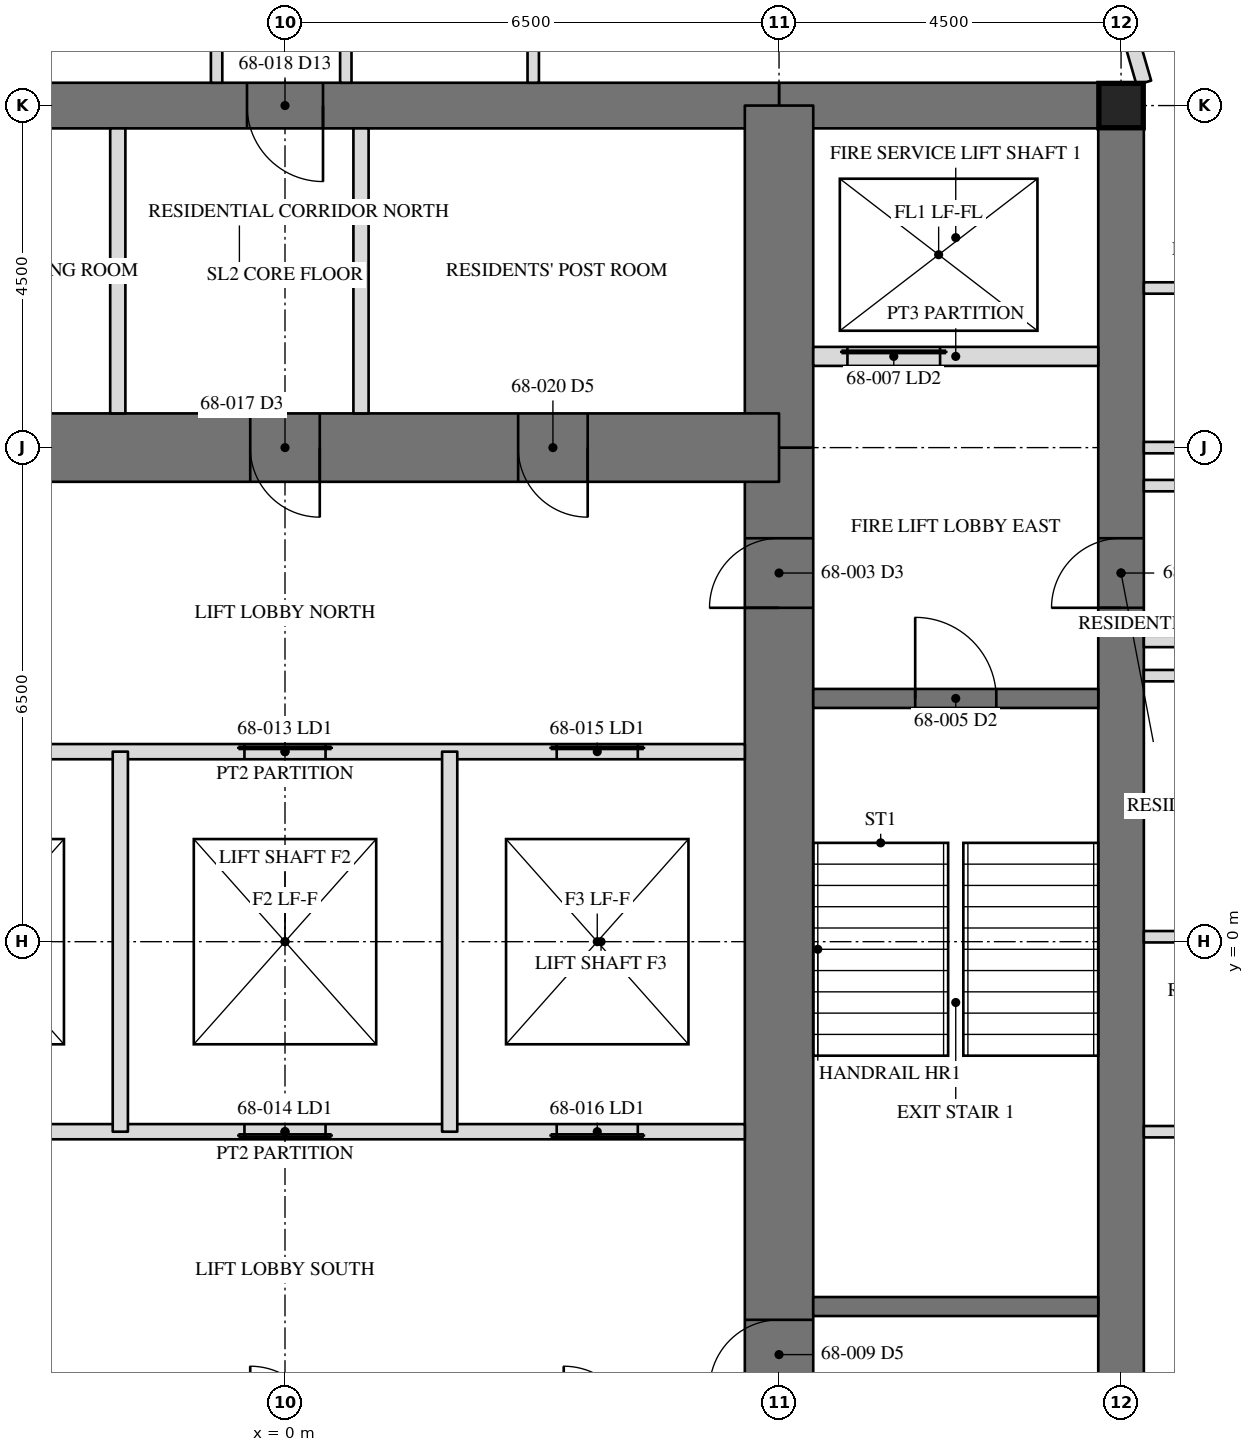
"""IFC4 building model, lengths in metres.
Left out: names, types, materials, properties, quantities, classifications, styles, units other than length and angle.
Written with IfcOpenShell. Run it as: python <this file> out.ifc"""

import sys

from ifc_helpers import new_model, si_unit, direction, frame, frame_2d, origin, origin_2d, place, context, subcontext, project, spatial, rectangle, hollow_rectangle, extrude, element, fill, save


model = new_model("IFC4")
c1 = context("Model", 3, precision=1e-05, world=origin(), true_north=direction((0.0, 1.0)))
c2 = subcontext(c1, "Body", "Model", "MODEL_VIEW")
j1 = project(units=[si_unit("LENGTHUNIT", "METRE"), si_unit("PLANEANGLEUNIT", "RADIAN")], contexts=[c1])
p1 = place(None, origin())
s1 = spatial("IfcSite", under=j1, at=p1, CompositionType="ELEMENT")
p2 = place(p1, origin())
s2 = spatial("IfcBuilding", under=s1, at=p2, CompositionType="ELEMENT")
p3 = place(p2, frame((0.0, 0.0, 277.6)))
s3 = spatial("IfcBuildingStorey", under=s2, at=p3, CompositionType="ELEMENT", Elevation=277.6)
p4 = place(p3, frame((11.0, -11.0, 0.0), z_axis=(0.0, 0.0, 1.0), x_axis=(0.0, 1.0, 0.0)))
e1 = element("IfcWall", 1, at=p4, inside=s3, PredefinedType="SHEAR", context=c2, shape_type="SweptSolid", body=[
    extrude(rectangle(XDim=22.0, YDim=0.6, at=frame_2d((11.0, 0.0))), origin(), (0.0, 0.0, 1.0), 3.6),
])
p5 = place(p4, frame((15.393, 0.0, 0.0)))
e2 = element("IfcOpeningElement", 2, at=p5, cuts=e1, PredefinedType="OPENING", context=c2, shape_type="SweptSolid", body=[
    extrude(rectangle(XDim=0.915, YDim=2.134, at=frame_2d((0.458, 1.067))), frame((0.0, 0.31, 0.0), z_axis=(0.0, -1.0, 0.0), x_axis=(1.0, 0.0, 0.0)), (0.0, 0.0, 1.0), 0.62),
])
p6 = place(p3, frame((11.0, 11.0, 0.0), z_axis=(0.0, 0.0, 1.0), x_axis=(-1.0, 0.0, 0.0)))
e3 = element("IfcWall", 3, at=p6, inside=s3, PredefinedType="SHEAR", context=c2, shape_type="SweptSolid", body=[
    extrude(rectangle(XDim=4.5, YDim=0.6, at=frame_2d((2.25, 0.0))), origin(), (0.0, 0.0, 1.0), 3.6),
])
p7 = place(p3, frame((6.5, 11.0, 0.0), z_axis=(0.0, 0.0, 1.0), x_axis=(-1.0, 0.0, 0.0)))
e4 = element("IfcWall", 4, at=p7, inside=s3, PredefinedType="SHEAR", context=c2, shape_type="SweptSolid", body=[
    extrude(rectangle(XDim=13.0, YDim=0.6, at=frame_2d((6.5, 0.0))), origin(), (0.0, 0.0, 1.0), 3.6),
])
p8 = place(p7, frame((6.0, 0.0, 0.0)))
e5 = element("IfcOpeningElement", 5, at=p8, cuts=e4, PredefinedType="OPENING", context=c2, shape_type="SweptSolid", body=[
    extrude(rectangle(XDim=1.0, YDim=2.134, at=frame_2d((0.5, 1.067))), frame((0.0, 0.31, 0.0), z_axis=(0.0, -1.0, 0.0), x_axis=(1.0, 0.0, 0.0)), (0.0, 0.0, 1.0), 0.62),
])
p9 = place(p3, frame((6.5, -6.5, 0.0), z_axis=(0.0, 0.0, 1.0), x_axis=(0.0, 1.0, 0.0)))
e6 = element("IfcWall", 6, at=p9, inside=s3, PredefinedType="SHEAR", context=c2, shape_type="SweptSolid", body=[
    extrude(rectangle(XDim=13.0, YDim=0.9, at=frame_2d((6.5, 0.0))), origin(), (0.0, 0.0, 1.0), 3.6),
])
p10 = place(p9, frame((10.893, 0.0, 0.0)))
e7 = element("IfcOpeningElement", 7, at=p10, cuts=e6, PredefinedType="OPENING", context=c2, shape_type="SweptSolid", body=[
    extrude(rectangle(XDim=0.915, YDim=2.134, at=frame_2d((0.458, 1.067))), frame((0.0, 0.46, 0.0), z_axis=(0.0, -1.0, 0.0), x_axis=(1.0, 0.0, 0.0)), (0.0, 0.0, 1.0), 0.92),
])
p11 = place(p9, frame((0.61, 0.0, 0.0)))
e8 = element("IfcOpeningElement", 8, at=p11, cuts=e6, PredefinedType="OPENING", context=c2, shape_type="SweptSolid", body=[
    extrude(rectangle(XDim=0.915, YDim=2.134, at=frame_2d((0.458, 1.067))), frame((0.0, 0.46, 0.0), z_axis=(0.0, -1.0, 0.0), x_axis=(1.0, 0.0, 0.0)), (0.0, 0.0, 1.0), 0.92),
])
p12 = place(p3, frame((6.5, 6.5, 0.0), z_axis=(0.0, 0.0, 1.0), x_axis=(0.0, 1.0, 0.0)))
e9 = element("IfcWall", 9, at=p12, inside=s3, PredefinedType="SHEAR", context=c2, shape_type="SweptSolid", body=[
    extrude(rectangle(XDim=4.5, YDim=0.9, at=frame_2d((2.25, 0.0))), origin(), (0.0, 0.0, 1.0), 3.6),
])
p13 = place(p3, frame((6.5, 6.5, 0.0), z_axis=(0.0, 0.0, 1.0), x_axis=(-1.0, 0.0, 0.0)))
e10 = element("IfcWall", 10, at=p13, inside=s3, PredefinedType="SHEAR", context=c2, shape_type="SweptSolid", body=[
    extrude(rectangle(XDim=13.0, YDim=0.9, at=frame_2d((6.5, 0.0))), origin(), (0.0, 0.0, 1.0), 3.6),
])
p14 = place(p13, frame((6.042, 0.0, 0.0)))
e11 = element("IfcOpeningElement", 11, at=p14, cuts=e10, PredefinedType="OPENING", context=c2, shape_type="SweptSolid", body=[
    extrude(rectangle(XDim=0.915, YDim=2.134, at=frame_2d((0.458, 1.067))), frame((0.0, 0.46, 0.0), z_axis=(0.0, -1.0, 0.0), x_axis=(1.0, 0.0, 0.0)), (0.0, 0.0, 1.0), 0.92),
])
p15 = place(p13, frame((10.066, 0.0, 0.0)))
e12 = element("IfcOpeningElement", 12, at=p15, cuts=e10, PredefinedType="OPENING", context=c2, shape_type="SweptSolid", body=[
    extrude(rectangle(XDim=1.118, YDim=2.134, at=frame_2d((0.559, 1.067))), frame((0.0, 0.46, 0.0), z_axis=(0.0, -1.0, 0.0), x_axis=(1.0, 0.0, 0.0)), (0.0, 0.0, 1.0), 0.92),
])
p16 = place(p13, frame((2.518, 0.0, 0.0)))
e13 = element("IfcOpeningElement", 13, at=p16, cuts=e10, PredefinedType="OPENING", context=c2, shape_type="SweptSolid", body=[
    extrude(rectangle(XDim=0.915, YDim=2.134, at=frame_2d((0.458, 1.067))), frame((0.0, 0.46, 0.0), z_axis=(0.0, -1.0, 0.0), x_axis=(1.0, 0.0, 0.0)), (0.0, 0.0, 1.0), 0.92),
])
p17 = place(p3, frame((11.0, 11.0, 0.0), z_axis=(0.0, 0.0, 1.0), x_axis=(1.0, 0.0, 0.0)))
e14 = element("IfcColumn", 14, at=p17, inside=s3, PredefinedType="COLUMN", context=c2, shape_type="SweptSolid", body=[
    extrude(hollow_rectangle(XDim=0.584, YDim=0.584, WallThickness=0.051, at=origin_2d()), origin(), (0.0, 0.0, 1.0), 3.6),
])
p18 = place(p3, frame((6.95, -4.8, 0.0), z_axis=(0.0, 0.0, 1.0), x_axis=(1.0, 0.0, 0.0)))
e15 = element("IfcWall", 15, at=p18, inside=s3, PredefinedType="SOLIDWALL", context=c2, shape_type="SweptSolid", body=[
    extrude(rectangle(XDim=3.75, YDim=0.25, at=frame_2d((1.875, 0.0))), origin(), (0.0, 0.0, 1.0), 3.41),
])
p19 = place(p3, frame((6.95, 3.2, 0.0), z_axis=(0.0, 0.0, 1.0), x_axis=(1.0, 0.0, 0.0)))
e16 = element("IfcWall", 16, at=p19, inside=s3, PredefinedType="SOLIDWALL", context=c2, shape_type="SweptSolid", body=[
    extrude(rectangle(XDim=3.75, YDim=0.25, at=frame_2d((1.875, 0.0))), origin(), (0.0, 0.0, 1.0), 3.41),
])
p20 = place(p19, frame((1.342, 0.0, 0.0)))
e17 = element("IfcOpeningElement", 17, at=p20, cuts=e16, PredefinedType="OPENING", context=c2, shape_type="SweptSolid", body=[
    extrude(rectangle(XDim=1.067, YDim=2.134, at=frame_2d((0.533, 1.067))), frame((0.0, 0.135, 0.0), z_axis=(0.0, -1.0, 0.0), x_axis=(1.0, 0.0, 0.0)), (0.0, 0.0, 1.0), 0.27),
])
p21 = place(p3, frame((6.95, 7.7, 0.0), z_axis=(0.0, 0.0, 1.0), x_axis=(1.0, 0.0, 0.0)))
e18 = element("IfcWall", 18, at=p21, inside=s3, PredefinedType="PARTITIONING", context=c2, shape_type="SweptSolid", body=[
    extrude(rectangle(XDim=3.75, YDim=0.25, at=frame_2d((1.875, 0.0))), origin(), (0.0, 0.0, 1.0), 3.41),
])
p22 = place(p21, frame((0.45, 0.0, 0.0)))
e19 = element("IfcOpeningElement", 19, at=p22, cuts=e18, PredefinedType="OPENING", context=c2, shape_type="SweptSolid", body=[
    extrude(rectangle(XDim=1.219, YDim=2.134, at=frame_2d((0.609, 1.067))), frame((0.0, 0.135, 0.0), z_axis=(0.0, -1.0, 0.0), x_axis=(1.0, 0.0, 0.0)), (0.0, 0.0, 1.0), 0.27),
])
p23 = place(p3, frame((-6.05, 2.5, 0.0), z_axis=(0.0, 0.0, 1.0), x_axis=(1.0, 0.0, 0.0)))
e20 = element("IfcWall", 20, at=p23, inside=s3, PredefinedType="PARTITIONING", context=c2, shape_type="SweptSolid", body=[
    extrude(rectangle(XDim=12.1, YDim=0.2, at=frame_2d((6.05, 0.0))), origin(), (0.0, 0.0, 1.0), 3.41),
])
p24 = place(p23, frame((1.408, 0.0, 0.0)))
e21 = element("IfcOpeningElement", 21, at=p24, cuts=e20, PredefinedType="OPENING", context=c2, shape_type="SweptSolid", body=[
    extrude(rectangle(XDim=1.067, YDim=2.134, at=frame_2d((0.533, 1.067))), frame((0.0, 0.11, 0.0), z_axis=(0.0, -1.0, 0.0), x_axis=(1.0, 0.0, 0.0)), (0.0, 0.0, 1.0), 0.22),
])
p25 = place(p23, frame((5.517, 0.0, 0.0)))
e22 = element("IfcOpeningElement", 22, at=p25, cuts=e20, PredefinedType="OPENING", context=c2, shape_type="SweptSolid", body=[
    extrude(rectangle(XDim=1.067, YDim=2.134, at=frame_2d((0.533, 1.067))), frame((0.0, 0.11, 0.0), z_axis=(0.0, -1.0, 0.0), x_axis=(1.0, 0.0, 0.0)), (0.0, 0.0, 1.0), 0.22),
])
p26 = place(p23, frame((9.625, 0.0, 0.0)))
e23 = element("IfcOpeningElement", 23, at=p26, cuts=e20, PredefinedType="OPENING", context=c2, shape_type="SweptSolid", body=[
    extrude(rectangle(XDim=1.067, YDim=2.134, at=frame_2d((0.533, 1.067))), frame((0.0, 0.11, 0.0), z_axis=(0.0, -1.0, 0.0), x_axis=(1.0, 0.0, 0.0)), (0.0, 0.0, 1.0), 0.22),
])
p27 = place(p3, frame((6.05, -2.5, 0.0), z_axis=(0.0, 0.0, 1.0), x_axis=(-1.0, 0.0, 0.0)))
e24 = element("IfcWall", 24, at=p27, inside=s3, PredefinedType="PARTITIONING", context=c2, shape_type="SweptSolid", body=[
    extrude(rectangle(XDim=12.1, YDim=0.2, at=frame_2d((6.05, 0.0))), origin(), (0.0, 0.0, 1.0), 3.41),
])
p28 = place(p27, frame((9.625, 0.0, 0.0)))
e25 = element("IfcOpeningElement", 25, at=p28, cuts=e24, PredefinedType="OPENING", context=c2, shape_type="SweptSolid", body=[
    extrude(rectangle(XDim=1.067, YDim=2.134, at=frame_2d((0.533, 1.067))), frame((0.0, 0.11, 0.0), z_axis=(0.0, -1.0, 0.0), x_axis=(1.0, 0.0, 0.0)), (0.0, 0.0, 1.0), 0.22),
])
p29 = place(p27, frame((5.517, 0.0, 0.0)))
e26 = element("IfcOpeningElement", 26, at=p29, cuts=e24, PredefinedType="OPENING", context=c2, shape_type="SweptSolid", body=[
    extrude(rectangle(XDim=1.067, YDim=2.134, at=frame_2d((0.533, 1.067))), frame((0.0, 0.11, 0.0), z_axis=(0.0, -1.0, 0.0), x_axis=(1.0, 0.0, 0.0)), (0.0, 0.0, 1.0), 0.22),
])
p30 = place(p27, frame((1.408, 0.0, 0.0)))
e27 = element("IfcOpeningElement", 27, at=p30, cuts=e24, PredefinedType="OPENING", context=c2, shape_type="SweptSolid", body=[
    extrude(rectangle(XDim=1.067, YDim=2.134, at=frame_2d((0.533, 1.067))), frame((0.0, 0.11, 0.0), z_axis=(0.0, -1.0, 0.0), x_axis=(1.0, 0.0, 0.0)), (0.0, 0.0, 1.0), 0.22),
])
for number, where, z_axis, x_axis in (
    (28, (-2.167, -2.5, 0.0), (0.0, 0.0, 1.0), (0.0, 1.0, 0.0)),
    (29, (2.167, -2.5, 0.0), (0.0, 0.0, 1.0), (0.0, 1.0, 0.0)),
):
    element("IfcWall", number, at=place(p3, frame(where, z_axis=z_axis, x_axis=x_axis)), inside=s3, PredefinedType="PARTITIONING", context=c2, shape_type="SweptSolid", body=[
        extrude(rectangle(XDim=5.0, YDim=0.2, at=frame_2d((2.5, 0.0))), origin(), (0.0, 0.0, 1.0), 3.41),
    ])
for number, where, z_axis, x_axis in (
    (30, (-2.2, 6.95, 0.0), (0.0, 0.0, 1.0), (0.0, 1.0, 0.0)),
    (31, (1.0, 6.95, 0.0), (0.0, 0.0, 1.0), (0.0, 1.0, 0.0)),
):
    element("IfcWall", number, at=place(p3, frame(where, z_axis=z_axis, x_axis=x_axis)), inside=s3, PredefinedType="PARTITIONING", context=c2, shape_type="SweptSolid", body=[
        extrude(rectangle(XDim=3.75, YDim=0.2, at=frame_2d((1.875, 0.0))), origin(), (0.0, 0.0, 1.0), 3.41),
    ])
p31 = place(p3, frame((11.3, 11.3, 0.0), z_axis=(0.0, 0.0, 1.0), x_axis=(-0.278099250491, 0.960552344683, 0.0)))
e32 = element("IfcWall", 32, at=p31, inside=s3, PredefinedType="PARTITIONING", context=c2, shape_type="SweptSolid", body=[
    extrude(rectangle(XDim=1.584, YDim=0.2, at=frame_2d((0.792, 0.0))), origin(), (0.0, 0.0, 1.0), 3.41),
])
p32 = place(p3, frame((11.3, 0.065, 0.0), z_axis=(0.0, 0.0, 1.0), x_axis=(1.0, 0.0, 0.0)))
e33 = element("IfcWall", 33, at=p32, inside=s3, PredefinedType="PARTITIONING", context=c2, shape_type="SweptSolid", body=[
    extrude(rectangle(XDim=5.615, YDim=0.15, at=frame_2d((2.808, 0.0))), origin(), (0.0, 0.0, 1.0), 2.709),
])
p33 = place(p32, frame((3.042, 0.0, 0.0)))
e34 = element("IfcOpeningElement", 34, at=p33, cuts=e33, PredefinedType="OPENING", context=c2, shape_type="SweptSolid", body=[
    extrude(rectangle(XDim=0.915, YDim=2.134, at=frame_2d((0.458, 1.067))), frame((0.0, 0.085, 0.0), z_axis=(0.0, -1.0, 0.0), x_axis=(1.0, 0.0, 0.0)), (0.0, 0.0, 1.0), 0.17),
])
p34 = place(p32, frame((4.058, 0.0, 0.0)))
e35 = element("IfcOpeningElement", 35, at=p34, cuts=e33, PredefinedType="OPENING", context=c2, shape_type="SweptSolid", body=[
    extrude(rectangle(XDim=0.915, YDim=2.134, at=frame_2d((0.458, 1.067))), frame((0.0, 0.085, 0.0), z_axis=(0.0, -1.0, 0.0), x_axis=(1.0, 0.0, 0.0)), (0.0, 0.0, 1.0), 0.17),
])
p35 = place(p3, frame((11.3, 6.5, 0.0), z_axis=(0.0, 0.0, 1.0), x_axis=(1.0, 0.0, 0.0)))
e36 = element("IfcWall", 36, at=p35, inside=s3, PredefinedType="PARTITIONING", context=c2, shape_type="SweptSolid", body=[
    extrude(rectangle(XDim=5.615, YDim=0.15, at=frame_2d((2.808, 0.0))), origin(), (0.0, 0.0, 1.0), 2.966),
])
p36 = place(p35, frame((2.742, 0.0, 0.0)))
e37 = element("IfcOpeningElement", 37, at=p36, cuts=e36, PredefinedType="OPENING", context=c2, shape_type="SweptSolid", body=[
    extrude(rectangle(XDim=0.915, YDim=2.134, at=frame_2d((0.458, 1.067))), frame((0.0, 0.085, 0.0), z_axis=(0.0, -1.0, 0.0), x_axis=(1.0, 0.0, 0.0)), (0.0, 0.0, 1.0), 0.17),
])
for number, where, z_axis, x_axis in (
    (38, (11.3, 3.95, 0.0), (0.0, 0.0, 1.0), (1.0, 0.0, 0.0)),
    (39, (11.3, 6.0, 0.0), (0.0, 0.0, 1.0), (1.0, 0.0, 0.0)),
):
    element("IfcWall", number, at=place(p3, frame(where, z_axis=z_axis, x_axis=x_axis)), inside=s3, PredefinedType="PARTITIONING", context=c2, shape_type="SweptSolid", body=[
        extrude(rectangle(XDim=1.525, YDim=0.15, at=frame_2d((0.762, 0.0))), origin(), (0.0, 0.0, 1.0), 3.41),
    ])
p37 = place(p3, frame((11.3, 3.5, 0.0), z_axis=(0.0, 0.0, 1.0), x_axis=(1.0, 0.0, 0.0)))
e40 = element("IfcWall", 40, at=p37, inside=s3, PredefinedType="PARTITIONING", context=c2, shape_type="SweptSolid", body=[
    extrude(rectangle(XDim=2.725, YDim=0.15, at=frame_2d((1.362, 0.0))), origin(), (0.0, 0.0, 1.0), 3.41),
])
p38 = place(p3, frame((11.3, 8.6, 0.0), z_axis=(0.0, 0.0, 1.0), x_axis=(1.0, 0.0, 0.0)))
e41 = element("IfcWall", 41, at=p38, inside=s3, PredefinedType="PARTITIONING", context=c2, shape_type="SweptSolid", body=[
    extrude(rectangle(XDim=1.925, YDim=0.15, at=frame_2d((0.962, 0.0))), origin(), (0.0, 0.0, 1.0), 3.41),
])
p39 = place(p3, frame((11.3, -2.5, 0.0), z_axis=(0.0, 0.0, 1.0), x_axis=(1.0, 0.0, 0.0)))
e42 = element("IfcWall", 42, at=p39, inside=s3, PredefinedType="PARTITIONING", context=c2, shape_type="SweptSolid", body=[
    extrude(rectangle(XDim=2.375, YDim=0.15, at=frame_2d((1.188, 0.0))), origin(), (0.0, 0.0, 1.0), 3.41),
])
p40 = place(p3, frame((3.266, 11.3, 0.0), z_axis=(0.0, 0.0, 1.0), x_axis=(0.0, 1.0, 0.0)))
e43 = element("IfcWall", 43, at=p40, inside=s3, PredefinedType="PARTITIONING", context=c2, shape_type="SweptSolid", body=[
    extrude(rectangle(XDim=5.615, YDim=0.15, at=frame_2d((2.808, 0.0))), origin(), (0.0, 0.0, 1.0), 2.709),
])
p41 = place(p40, frame((3.242, 0.0, 0.0)))
e44 = element("IfcOpeningElement", 44, at=p41, cuts=e43, PredefinedType="OPENING", context=c2, shape_type="SweptSolid", body=[
    extrude(rectangle(XDim=0.915, YDim=2.134, at=frame_2d((0.458, 1.067))), frame((0.0, 0.085, 0.0), z_axis=(0.0, -1.0, 0.0), x_axis=(1.0, 0.0, 0.0)), (0.0, 0.0, 1.0), 0.17),
])
p42 = place(p3, frame((-0.9, 11.3, 0.0), z_axis=(0.0, 0.0, 1.0), x_axis=(0.0, 1.0, 0.0)))
e45 = element("IfcWall", 45, at=p42, inside=s3, PredefinedType="PARTITIONING", context=c2, shape_type="SweptSolid", body=[
    extrude(rectangle(XDim=2.725, YDim=0.15, at=frame_2d((1.362, 0.0))), origin(), (0.0, 0.0, 1.0), 3.41),
])
p43 = place(p3, frame((0.8, 11.3, 0.0), z_axis=(0.0, 0.0, 1.0), x_axis=(0.0, 1.0, 0.0)))
e46 = element("IfcWall", 46, at=p43, inside=s3, PredefinedType="PARTITIONING", context=c2, shape_type="SweptSolid", body=[
    extrude(rectangle(XDim=2.375, YDim=0.15, at=frame_2d((1.188, 0.0))), origin(), (0.0, 0.0, 1.0), 3.41),
])
p44 = place(p5, origin())
e47 = element("IfcDoor", 47, at=p44, inside=s3, OperationType="SINGLE_SWING_RIGHT", PredefinedType="DOOR", context=c2, shape_type="SweptSolid", body=[
    extrude(rectangle(XDim=0.915, YDim=2.134, at=frame_2d((0.458, 1.067))), frame((0.0, -0.225, 0.0), z_axis=(0.0, -1.0, 0.0), x_axis=(1.0, 0.0, 0.0)), (0.0, 0.0, 1.0), 0.05),
])
fill(e2, e47)
p45 = place(p10, origin())
e48 = element("IfcDoor", 48, at=p45, inside=s3, OperationType="SINGLE_SWING_RIGHT", PredefinedType="DOOR", context=c2, shape_type="SweptSolid", body=[
    extrude(rectangle(XDim=0.915, YDim=2.134, at=frame_2d((0.458, 1.067))), frame((0.0, -0.375, 0.0), z_axis=(0.0, -1.0, 0.0), x_axis=(1.0, 0.0, 0.0)), (0.0, 0.0, 1.0), 0.05),
])
fill(e7, e48)
p46 = place(p20, origin())
e49 = element("IfcDoor", 49, at=p46, inside=s3, OperationType="SINGLE_SWING_LEFT", PredefinedType="DOOR", context=c2, shape_type="SweptSolid", body=[
    extrude(rectangle(XDim=1.067, YDim=2.134, at=frame_2d((0.533, 1.067))), frame((0.0, 0.025, 0.0), z_axis=(0.0, -1.0, 0.0), x_axis=(1.0, 0.0, 0.0)), (0.0, 0.0, 1.0), 0.05),
])
fill(e17, e49)
p47 = place(p22, origin())
e50 = element("IfcDoor", 50, at=p47, inside=s3, OperationType="SLIDING_TO_LEFT", PredefinedType="DOOR", context=c2, shape_type="SweptSolid", body=[
    extrude(rectangle(XDim=1.219, YDim=2.134, at=frame_2d((0.609, 1.067))), frame((0.0, 0.025, 0.0), z_axis=(0.0, -1.0, 0.0), x_axis=(1.0, 0.0, 0.0)), (0.0, 0.0, 1.0), 0.05),
])
fill(e19, e50)
p48 = place(p11, origin())
e51 = element("IfcDoor", 51, at=p48, inside=s3, OperationType="SINGLE_SWING_RIGHT", PredefinedType="DOOR", context=c2, shape_type="SweptSolid", body=[
    extrude(rectangle(XDim=0.915, YDim=2.134, at=frame_2d((0.458, 1.067))), frame((0.0, -0.375, 0.0), z_axis=(0.0, -1.0, 0.0), x_axis=(1.0, 0.0, 0.0)), (0.0, 0.0, 1.0), 0.05),
])
fill(e8, e51)
p49 = place(p25, origin())
e52 = element("IfcDoor", 52, at=p49, inside=s3, OperationType="SLIDING_TO_LEFT", PredefinedType="DOOR", context=c2, shape_type="SweptSolid", body=[
    extrude(rectangle(XDim=1.067, YDim=2.134, at=frame_2d((0.533, 1.067))), frame((0.0, 0.025, 0.0), z_axis=(0.0, -1.0, 0.0), x_axis=(1.0, 0.0, 0.0)), (0.0, 0.0, 1.0), 0.05),
])
fill(e22, e52)
p50 = place(p29, origin())
e53 = element("IfcDoor", 53, at=p50, inside=s3, OperationType="SLIDING_TO_LEFT", PredefinedType="DOOR", context=c2, shape_type="SweptSolid", body=[
    extrude(rectangle(XDim=1.067, YDim=2.134, at=frame_2d((0.533, 1.067))), frame((0.0, 0.025, 0.0), z_axis=(0.0, -1.0, 0.0), x_axis=(1.0, 0.0, 0.0)), (0.0, 0.0, 1.0), 0.05),
])
fill(e26, e53)
p51 = place(p26, origin())
e54 = element("IfcDoor", 54, at=p51, inside=s3, OperationType="SLIDING_TO_LEFT", PredefinedType="DOOR", context=c2, shape_type="SweptSolid", body=[
    extrude(rectangle(XDim=1.067, YDim=2.134, at=frame_2d((0.533, 1.067))), frame((0.0, 0.025, 0.0), z_axis=(0.0, -1.0, 0.0), x_axis=(1.0, 0.0, 0.0)), (0.0, 0.0, 1.0), 0.05),
])
fill(e23, e54)
p52 = place(p30, origin())
e55 = element("IfcDoor", 55, at=p52, inside=s3, OperationType="SLIDING_TO_LEFT", PredefinedType="DOOR", context=c2, shape_type="SweptSolid", body=[
    extrude(rectangle(XDim=1.067, YDim=2.134, at=frame_2d((0.533, 1.067))), frame((0.0, 0.025, 0.0), z_axis=(0.0, -1.0, 0.0), x_axis=(1.0, 0.0, 0.0)), (0.0, 0.0, 1.0), 0.05),
])
fill(e27, e55)
p53 = place(p14, origin())
e56 = element("IfcDoor", 56, at=p53, inside=s3, OperationType="SINGLE_SWING_RIGHT", PredefinedType="DOOR", context=c2, shape_type="SweptSolid", body=[
    extrude(rectangle(XDim=0.915, YDim=2.134, at=frame_2d((0.458, 1.067))), frame((0.0, -0.375, 0.0), z_axis=(0.0, -1.0, 0.0), x_axis=(1.0, 0.0, 0.0)), (0.0, 0.0, 1.0), 0.05),
])
fill(e11, e56)
p54 = place(p8, origin())
e57 = element("IfcDoor", 57, at=p54, inside=s3, OperationType="SINGLE_SWING_RIGHT", PredefinedType="DOOR", context=c2, shape_type="SweptSolid", body=[
    extrude(rectangle(XDim=1.0, YDim=2.134, at=frame_2d((0.5, 1.067))), frame((0.0, -0.225, 0.0), z_axis=(0.0, -1.0, 0.0), x_axis=(1.0, 0.0, 0.0)), (0.0, 0.0, 1.0), 0.05),
])
fill(e5, e57)
p55 = place(p16, origin())
e58 = element("IfcDoor", 58, at=p55, inside=s3, OperationType="SINGLE_SWING_RIGHT", PredefinedType="DOOR", context=c2, shape_type="SweptSolid", body=[
    extrude(rectangle(XDim=0.915, YDim=2.134, at=frame_2d((0.458, 1.067))), frame((0.0, -0.375, 0.0), z_axis=(0.0, -1.0, 0.0), x_axis=(1.0, 0.0, 0.0)), (0.0, 0.0, 1.0), 0.05),
])
fill(e13, e58)
save(model, sys.argv[1])
